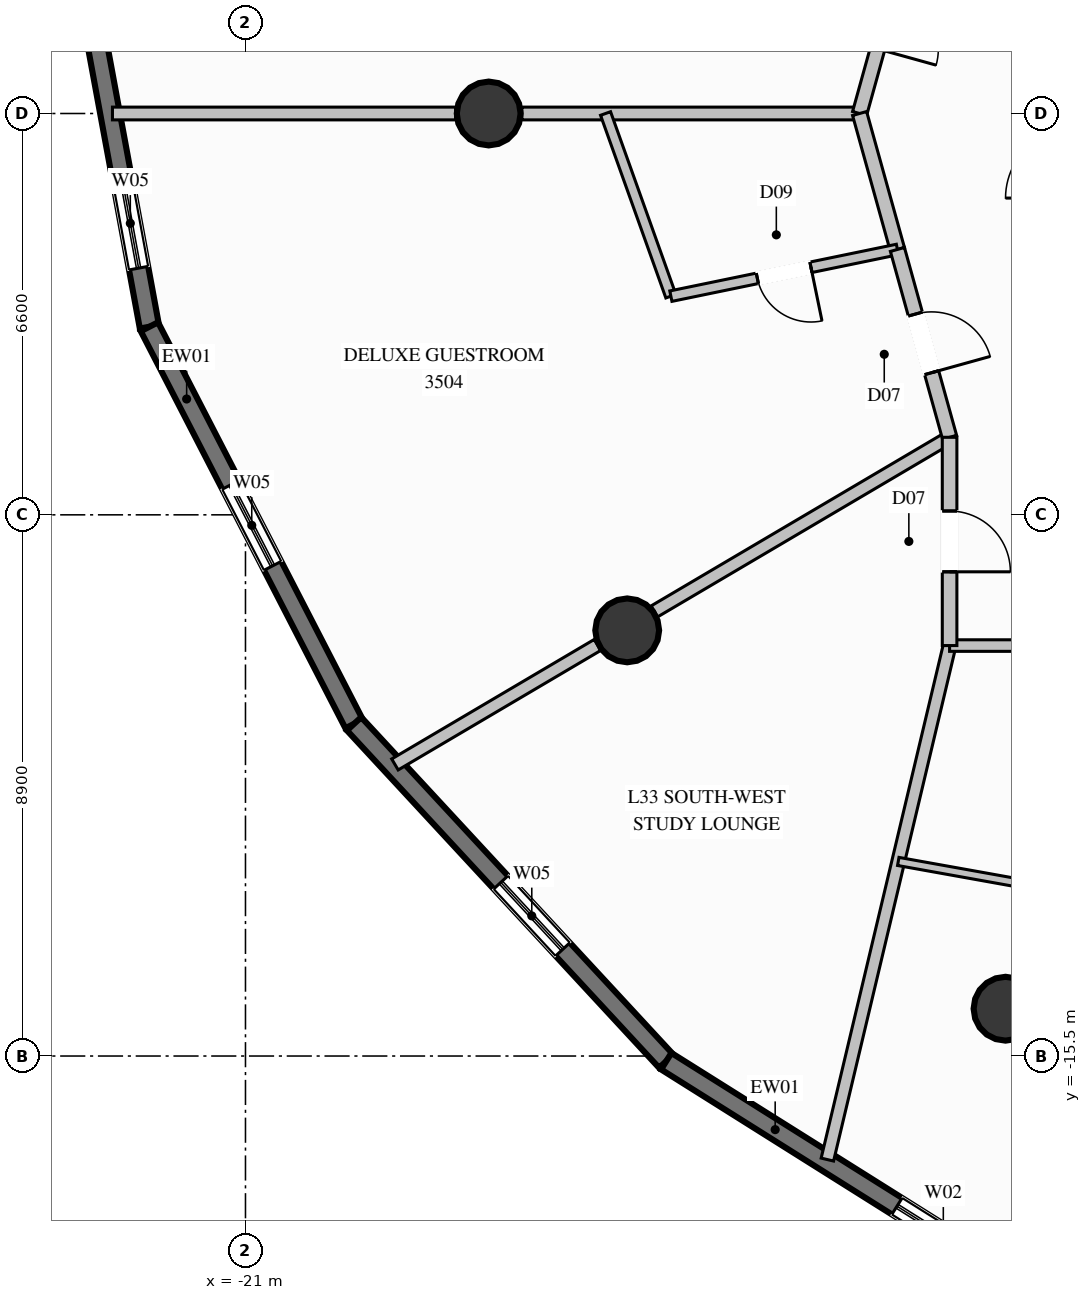
"""IFC4 building model, lengths in metres.
Left out: names, types, materials, properties, quantities, classifications, styles, units other than length and angle.
Written with IfcOpenShell. Run it as: python <this file> out.ifc"""

import sys

from ifc_helpers import new_model, si_unit, direction, frame, frame_2d, origin, origin_2d, place, context, subcontext, project, spatial, rectangle, circle, extrude, element, fill, save


model = new_model("IFC4")
c1 = context("Model", 3, precision=1e-05, world=origin(), true_north=direction((0.0, 1.0)))
c2 = subcontext(c1, "Body", "Model", "MODEL_VIEW")
j1 = project(units=[si_unit("LENGTHUNIT", "METRE"), si_unit("PLANEANGLEUNIT", "RADIAN")], contexts=[c1])
p1 = place(None, origin())
s1 = spatial("IfcSite", under=j1, at=p1, CompositionType="ELEMENT")
p2 = place(p1, origin())
s2 = spatial("IfcBuilding", under=s1, at=p2, CompositionType="ELEMENT")
p3 = place(p2, frame((0.0, 0.0, 131.4)))
s3 = spatial("IfcBuildingStorey", under=s2, at=p3, CompositionType="ELEMENT", Elevation=131.4)
for number, where, z_axis, x_axis in (
    (1, (-17.0, 0.0, 0.0), (0.0, 0.0, 1.0), (1.0, 0.0, 0.0)),
    (2, (-14.722, -8.5, 0.0), (0.0, 0.0, 1.0), (1.0, 0.0, 0.0)),
    (3, (-8.5, -14.722, 0.0), (0.0, 0.0, 1.0), (1.0, 0.0, 0.0)),
):
    element("IfcColumn", number, at=place(p3, frame(where, z_axis=z_axis, x_axis=x_axis)), inside=s3, PredefinedType="COLUMN", context=c2, shape_type="SweptSolid", body=[
        extrude(circle(Radius=0.525, at=origin_2d()), origin(), (0.0, 0.0, 1.0), 3.6),
    ])
p4 = place(p3, frame((-22.58, -3.507, 0.0), z_axis=(0.0, 0.0, 1.0), x_axis=(-0.181571385037, 0.983377766749, 0.0)))
e4 = element("IfcWall", 4, at=p4, inside=s3, PredefinedType="SOLIDWALL", context=c2, shape_type="SweptSolid", body=[
    extrude(rectangle(XDim=6.989, YDim=0.32, at=frame_2d((3.495, 0.0))), origin(), (0.0, 0.0, 1.0), 3.35),
])
p5 = place(p4, frame((0.98, 0.0, 0.85)))
e5 = element("IfcOpeningElement", 5, at=p5, cuts=e4, PredefinedType="OPENING", context=c2, shape_type="SweptSolid", body=[
    extrude(rectangle(XDim=1.5, YDim=1.2, at=frame_2d((0.75, 0.6))), frame((0.0, 0.17, 0.0), z_axis=(0.0, -1.0, 0.0), x_axis=(1.0, 0.0, 0.0)), (0.0, 0.0, 1.0), 0.34),
])
p6 = place(p3, frame((-19.214, -10.037, 0.0), z_axis=(0.0, 0.0, 1.0), x_axis=(-0.458173043938, 0.888863016335, 0.0)))
e6 = element("IfcWall", 6, at=p6, inside=s3, PredefinedType="SOLIDWALL", context=c2, shape_type="SweptSolid", body=[
    extrude(rectangle(XDim=7.346, YDim=0.32, at=frame_2d((3.673, 0.0))), origin(), (0.0, 0.0, 1.0), 3.35),
])
p7 = place(p6, frame((2.923, 0.0, 0.85)))
e7 = element("IfcOpeningElement", 7, at=p7, cuts=e6, PredefinedType="OPENING", context=c2, shape_type="SweptSolid", body=[
    extrude(rectangle(XDim=1.5, YDim=1.2, at=frame_2d((0.75, 0.6))), frame((0.0, 0.17, 0.0), z_axis=(0.0, -1.0, 0.0), x_axis=(1.0, 0.0, 0.0)), (0.0, 0.0, 1.0), 0.34),
])
p8 = place(p3, frame((-14.08, -15.585, 0.0), z_axis=(0.0, 0.0, 1.0), x_axis=(-0.679203838045, 0.733949689274, 0.0)))
e8 = element("IfcWall", 8, at=p8, inside=s3, PredefinedType="SOLIDWALL", context=c2, shape_type="SweptSolid", body=[
    extrude(rectangle(XDim=7.559, YDim=0.32, at=frame_2d((3.779, 0.0))), origin(), (0.0, 0.0, 1.0), 3.35),
])
p9 = place(p8, frame((2.506, 0.0, 0.85)))
e9 = element("IfcOpeningElement", 9, at=p9, cuts=e8, PredefinedType="OPENING", context=c2, shape_type="SweptSolid", body=[
    extrude(rectangle(XDim=1.5, YDim=1.2, at=frame_2d((0.75, 0.6))), frame((0.0, 0.17, 0.0), z_axis=(0.0, -1.0, 0.0), x_axis=(1.0, 0.0, 0.0)), (0.0, 0.0, 1.0), 0.34),
])
p10 = place(p3, frame((-7.679, -19.607, 0.0), z_axis=(0.0, 0.0, 1.0), x_axis=(-0.84673132195, 0.5320207406, 0.0)))
e10 = element("IfcWall", 10, at=p10, inside=s3, PredefinedType="SOLIDWALL", context=c2, shape_type="SweptSolid", body=[
    extrude(rectangle(XDim=7.56, YDim=0.32, at=frame_2d((3.78, 0.0))), origin(), (0.0, 0.0, 1.0), 3.35),
])
p11 = place(p10, frame((1.278, 0.0, 0.35)))
e11 = element("IfcOpeningElement", 11, at=p11, cuts=e10, PredefinedType="OPENING", context=c2, shape_type="SweptSolid", body=[
    extrude(rectangle(XDim=1.8, YDim=2.6, at=frame_2d((0.9, 1.3))), frame((0.0, 0.17, 0.0), z_axis=(0.0, -1.0, 0.0), x_axis=(1.0, 0.0, 0.0)), (0.0, 0.0, 1.0), 0.34),
])
p12 = place(p3, frame((-10.9, 0.0, 0.0), z_axis=(0.0, 0.0, 1.0), x_axis=(-1.0, 0.0, 0.0)))
e12 = element("IfcWall", 12, at=p12, inside=s3, PredefinedType="PARTITIONING", context=c2, shape_type="SweptSolid", body=[
    extrude(rectangle(XDim=5.555, YDim=0.21, at=frame_2d((2.778, 0.0))), origin(), (0.0, 0.0, 1.0), 3.35),
])
p13 = place(p3, frame((-17.545, 0.0, 0.0), z_axis=(0.0, 0.0, 1.0), x_axis=(-1.0, 0.0, 0.0)))
e13 = element("IfcWall", 13, at=p13, inside=s3, PredefinedType="PARTITIONING", context=c2, shape_type="SweptSolid", body=[
    extrude(rectangle(XDim=5.643, YDim=0.21, at=frame_2d((2.822, 0.0))), origin(), (0.0, 0.0, 1.0), 3.35),
])
p14 = place(p3, frame((-9.42, -5.325, 0.0), z_axis=(0.0, 0.0, 1.0), x_axis=(-0.861378052692, -0.507964418381, 0.0)))
e14 = element("IfcWall", 14, at=p14, inside=s3, PredefinedType="PARTITIONING", context=c2, shape_type="SweptSolid", body=[
    extrude(rectangle(XDim=5.636, YDim=0.21, at=frame_2d((2.818, 0.0))), origin(), (0.0, 0.0, 1.0), 2.791),
])
p15 = place(p3, frame((-15.211, -8.74, 0.0), z_axis=(0.0, 0.0, 1.0), x_axis=(-0.861295778751, -0.508103908177, 0.0)))
e15 = element("IfcWall", 15, at=p15, inside=s3, PredefinedType="PARTITIONING", context=c2, shape_type="SweptSolid", body=[
    extrude(rectangle(XDim=3.867, YDim=0.21, at=frame_2d((1.934, 0.0))), origin(), (0.0, 0.0, 1.0), 3.35),
])
p16 = place(p3, frame((-10.042, 3.089, 0.0), z_axis=(0.0, 0.0, 1.0), x_axis=(-0.267592805492, -0.963532091032, 0.0)))
e16 = element("IfcWall", 16, at=p16, inside=s3, PredefinedType="PARTITIONING", context=c2, shape_type="SweptSolid", body=[
    extrude(rectangle(XDim=3.206, YDim=0.24, at=frame_2d((1.603, 0.0))), origin(), (0.0, 0.0, 1.0), 3.35),
])
p17 = place(p16, frame((1.103, 0.0, 0.0)))
e17 = element("IfcOpeningElement", 17, at=p17, cuts=e16, PredefinedType="OPENING", context=c2, shape_type="SweptSolid", body=[
    extrude(rectangle(XDim=1.0, YDim=2.2, at=frame_2d((0.5, 1.1))), frame((0.0, 0.13, 0.0), z_axis=(0.0, -1.0, 0.0), x_axis=(1.0, 0.0, 0.0)), (0.0, 0.0, 1.0), 0.26),
])
p18 = place(p3, frame((-10.9, 0.0, 0.0), z_axis=(0.0, 0.0, 1.0), x_axis=(0.267920543299, -0.963441011416, 0.0)))
e18 = element("IfcWall", 18, at=p18, inside=s3, PredefinedType="PARTITIONING", context=c2, shape_type="SweptSolid", body=[
    extrude(rectangle(XDim=2.321, YDim=0.24, at=frame_2d((1.161, 0.0))), origin(), (0.0, 0.0, 1.0), 3.35),
])
p19 = place(p3, frame((-15.078, 0.0, 0.0), z_axis=(0.0, 0.0, 1.0), x_axis=(0.336656350005, -0.941627581373, 0.0)))
e19 = element("IfcWall", 19, at=p19, inside=s3, PredefinedType="PLUMBINGWALL", context=c2, shape_type="SweptSolid", body=[
    extrude(rectangle(XDim=3.19, YDim=0.175, at=frame_2d((1.595, 0.0))), origin(), (0.0, 0.0, 1.0), 3.35),
])
p20 = place(p3, frame((-10.278, -2.236, 0.0), z_axis=(0.0, 0.0, 1.0), x_axis=(-0.979418625289, -0.201839432313, 0.0)))
e20 = element("IfcWall", 20, at=p20, inside=s3, PredefinedType="PLUMBINGWALL", context=c2, shape_type="SweptSolid", body=[
    extrude(rectangle(XDim=3.804, YDim=0.175, at=frame_2d((1.902, 0.0))), origin(), (0.0, 0.0, 1.0), 3.35),
])
p21 = place(p20, frame((1.452, 0.0, 0.0)))
e21 = element("IfcOpeningElement", 21, at=p21, cuts=e20, PredefinedType="OPENING", context=c2, shape_type="SweptSolid", body=[
    extrude(rectangle(XDim=0.9, YDim=2.1, at=frame_2d((0.45, 1.05))), frame((0.0, 0.098, 0.0), z_axis=(0.0, -1.0, 0.0), x_axis=(1.0, 0.0, 0.0)), (0.0, 0.0, 1.0), 0.195),
])
p22 = place(p3, frame((-10.278, -2.236, 0.0), z_axis=(0.0, 0.0, 1.0), x_axis=(0.267683140967, -0.96350699844, 0.0)))
e22 = element("IfcWall", 22, at=p22, inside=s3, PredefinedType="PARTITIONING", context=c2, shape_type="SweptSolid", body=[
    extrude(rectangle(XDim=3.206, YDim=0.24, at=frame_2d((1.603, 0.0))), origin(), (0.0, 0.0, 1.0), 3.35),
])
p23 = place(p22, frame((1.103, 0.0, 0.0)))
e23 = element("IfcOpeningElement", 23, at=p23, cuts=e22, PredefinedType="OPENING", context=c2, shape_type="SweptSolid", body=[
    extrude(rectangle(XDim=1.0, YDim=2.2, at=frame_2d((0.5, 1.1))), frame((0.0, 0.13, 0.0), z_axis=(0.0, -1.0, 0.0), x_axis=(1.0, 0.0, 0.0)), (0.0, 0.0, 1.0), 0.26),
])
p24 = place(p3, frame((-9.42, -8.75, 0.0), z_axis=(0.0, 0.0, 1.0), x_axis=(-0.231339406626, -0.972873105262, 0.0)))
e24 = element("IfcWall", 24, at=p24, inside=s3, PredefinedType="PARTITIONING", context=c2, shape_type="SweptSolid", body=[
    extrude(rectangle(XDim=8.688, YDim=0.21, at=frame_2d((4.344, 0.0))), origin(), (0.0, 0.0, 1.0), 3.35),
])
p25 = place(p3, frame((-9.42, -8.75, 0.0), z_axis=(0.0, 0.0, 1.0), x_axis=(1.0, 0.0, 0.0)))
e25 = element("IfcWall", 25, at=p25, inside=s3, PredefinedType="PARTITIONING", context=c2, shape_type="SweptSolid", body=[
    extrude(rectangle(XDim=9.42, YDim=0.19, at=frame_2d((4.71, 0.0))), origin(), (0.0, 0.0, 1.0), 3.35),
])
p26 = place(p25, frame((4.235, 0.0, 0.0)))
e26 = element("IfcOpeningElement", 26, at=p26, cuts=e25, PredefinedType="OPENING", context=c2, shape_type="SweptSolid", body=[
    extrude(rectangle(XDim=0.95, YDim=2.1, at=frame_2d((0.475, 1.05))), frame((0.0, 0.105, 0.0), z_axis=(0.0, -1.0, 0.0), x_axis=(1.0, 0.0, 0.0)), (0.0, 0.0, 1.0), 0.21),
])
p27 = place(p3, frame((-9.42, -5.325, 0.0), z_axis=(0.0, 0.0, 1.0), x_axis=(0.0, -1.0, 0.0)))
e27 = element("IfcWall", 27, at=p27, inside=s3, PredefinedType="PARTITIONING", context=c2, shape_type="SweptSolid", body=[
    extrude(rectangle(XDim=3.425, YDim=0.24, at=frame_2d((1.712, 0.0))), origin(), (0.0, 0.0, 1.0), 3.35),
])
p28 = place(p27, frame((1.212, 0.0, 0.0)))
e28 = element("IfcOpeningElement", 28, at=p28, cuts=e27, PredefinedType="OPENING", context=c2, shape_type="SweptSolid", body=[
    extrude(rectangle(XDim=1.0, YDim=2.2, at=frame_2d((0.5, 1.1))), frame((0.0, 0.13, 0.0), z_axis=(0.0, -1.0, 0.0), x_axis=(1.0, 0.0, 0.0)), (0.0, 0.0, 1.0), 0.26),
])
p29 = place(p3, frame((-10.264, -12.3, 0.0), z_axis=(0.0, 0.0, 1.0), x_axis=(0.984295895502, -0.176526457218, 0.0)))
e29 = element("IfcWall", 29, at=p29, inside=s3, PredefinedType="PARTITIONING", context=c2, shape_type="SweptSolid", body=[
    extrude(rectangle(XDim=10.622, YDim=0.135, at=frame_2d((5.311, 0.0))), origin(), (0.0, 0.0, 1.0), 3.35),
])
p30 = place(p29, frame((4.836, 0.0, 0.0)))
e30 = element("IfcOpeningElement", 30, at=p30, cuts=e29, PredefinedType="OPENING", context=c2, shape_type="SweptSolid", body=[
    extrude(rectangle(XDim=0.95, YDim=2.1, at=frame_2d((0.475, 1.05))), frame((0.0, 0.078, 0.0), z_axis=(0.0, -1.0, 0.0), x_axis=(1.0, 0.0, 0.0)), (0.0, 0.0, 1.0), 0.155),
])
p31 = place(p5, origin())
e31 = element("IfcWindow", 31, at=p31, inside=s3, PartitioningType="SINGLE_PANEL", PredefinedType="WINDOW", context=c2, shape_type="SweptSolid", body=[
    extrude(rectangle(XDim=1.5, YDim=1.2, at=frame_2d((0.75, 0.6))), frame((0.0, 0.03, 0.0), z_axis=(0.0, -1.0, 0.0), x_axis=(1.0, 0.0, 0.0)), (0.0, 0.0, 1.0), 0.06),
])
fill(e5, e31)
p32 = place(p7, origin())
e32 = element("IfcWindow", 32, at=p32, inside=s3, PartitioningType="SINGLE_PANEL", PredefinedType="WINDOW", context=c2, shape_type="SweptSolid", body=[
    extrude(rectangle(XDim=1.5, YDim=1.2, at=frame_2d((0.75, 0.6))), frame((0.0, 0.03, 0.0), z_axis=(0.0, -1.0, 0.0), x_axis=(1.0, 0.0, 0.0)), (0.0, 0.0, 1.0), 0.06),
])
fill(e7, e32)
p33 = place(p9, origin())
e33 = element("IfcWindow", 33, at=p33, inside=s3, PartitioningType="SINGLE_PANEL", PredefinedType="WINDOW", context=c2, shape_type="SweptSolid", body=[
    extrude(rectangle(XDim=1.5, YDim=1.2, at=frame_2d((0.75, 0.6))), frame((0.0, 0.03, 0.0), z_axis=(0.0, -1.0, 0.0), x_axis=(1.0, 0.0, 0.0)), (0.0, 0.0, 1.0), 0.06),
])
fill(e9, e33)
p34 = place(p11, origin())
e34 = element("IfcWindow", 34, at=p34, inside=s3, PartitioningType="SINGLE_PANEL", PredefinedType="WINDOW", context=c2, shape_type="SweptSolid", body=[
    extrude(rectangle(XDim=1.8, YDim=2.6, at=frame_2d((0.9, 1.3))), frame((0.0, 0.03, 0.0), z_axis=(0.0, -1.0, 0.0), x_axis=(1.0, 0.0, 0.0)), (0.0, 0.0, 1.0), 0.06),
])
fill(e11, e34)
p35 = place(p21, origin())
e35 = element("IfcDoor", 35, at=p35, inside=s3, OperationType="SINGLE_SWING_LEFT", PredefinedType="DOOR", context=c2, shape_type="SweptSolid", body=[
    extrude(rectangle(XDim=0.9, YDim=2.1, at=frame_2d((0.45, 1.05))), frame((0.0, 0.025, 0.0), z_axis=(0.0, -1.0, 0.0), x_axis=(1.0, 0.0, 0.0)), (0.0, 0.0, 1.0), 0.05),
])
fill(e21, e35)
p36 = place(p23, origin())
e36 = element("IfcDoor", 36, at=p36, inside=s3, OperationType="SINGLE_SWING_RIGHT", PredefinedType="DOOR", context=c2, shape_type="SweptSolid", body=[
    extrude(rectangle(XDim=1.0, YDim=2.2, at=frame_2d((0.5, 1.1))), frame((0.0, 0.025, 0.0), z_axis=(0.0, -1.0, 0.0), x_axis=(1.0, 0.0, 0.0)), (0.0, 0.0, 1.0), 0.05),
])
fill(e23, e36)
p37 = place(p28, origin())
e37 = element("IfcDoor", 37, at=p37, inside=s3, OperationType="SINGLE_SWING_RIGHT", PredefinedType="DOOR", context=c2, shape_type="SweptSolid", body=[
    extrude(rectangle(XDim=1.0, YDim=2.2, at=frame_2d((0.5, 1.1))), frame((0.0, 0.025, 0.0), z_axis=(0.0, -1.0, 0.0), x_axis=(1.0, 0.0, 0.0)), (0.0, 0.0, 1.0), 0.05),
])
fill(e28, e37)
save(model, sys.argv[1])
